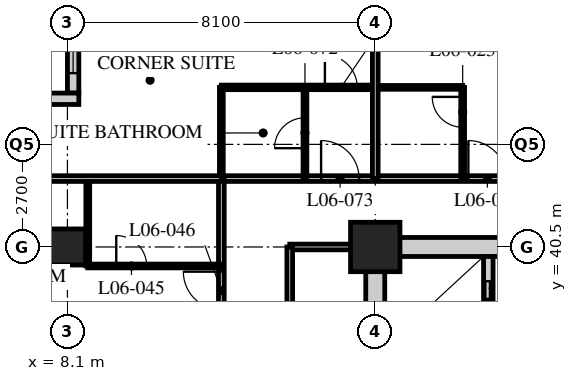
"""IFC4 building model, lengths in metres.
Left out: names, types, materials, properties, quantities, classifications, styles, units other than length and angle.
Written with IfcOpenShell. Run it as: python <this file> out.ifc"""

import sys

from ifc_helpers import new_model, si_unit, direction, frame, frame_2d, origin, origin_2d, place, context, subcontext, project, spatial, rectangle, hollow_rectangle, extrude, element, fill, save


model = new_model("IFC4")
c1 = context("Model", 3, precision=1e-05, world=origin(), true_north=direction((0.0, 1.0)))
c2 = subcontext(c1, "Body", "Model", "MODEL_VIEW")
j1 = project(units=[si_unit("LENGTHUNIT", "METRE"), si_unit("PLANEANGLEUNIT", "RADIAN")], contexts=[c1])
p1 = place(None, origin())
s1 = spatial("IfcSite", under=j1, at=p1, CompositionType="ELEMENT")
p2 = place(p1, origin())
s2 = spatial("IfcBuilding", under=s1, at=p2, CompositionType="ELEMENT")
p3 = place(p2, frame((0.0, 0.0, 33.0)))
s3 = spatial("IfcBuildingStorey", under=s2, at=p3, CompositionType="ELEMENT", Elevation=33.0)
p4 = place(p3, frame((8.1, 40.5, 0.0), z_axis=(0.0, 0.0, 1.0), x_axis=(1.0, 0.0, 0.0)))
e1 = element("IfcColumn", 1, at=p4, inside=s3, PredefinedType="COLUMN", context=c2, shape_type="SweptSolid", body=[
    extrude(hollow_rectangle(XDim=0.95, YDim=0.95, WallThickness=0.095, at=origin_2d()), origin(), (0.0, 0.0, 1.0), 3.4),
])
p5 = place(p3, frame((16.2, 40.5, 0.0), z_axis=(0.0, 0.0, 1.0), x_axis=(1.0, 0.0, 0.0)))
e2 = element("IfcColumn", 2, at=p5, inside=s3, PredefinedType="COLUMN", context=c2, shape_type="SweptSolid", body=[
    extrude(hollow_rectangle(XDim=1.3, YDim=1.3, WallThickness=0.13, at=origin_2d()), origin(), (0.0, 0.0, 1.0), 3.4),
])
p6 = place(p3, frame((8.25, 48.3, 0.0), z_axis=(0.0, 0.0, 1.0), x_axis=(0.0, -1.0, 0.0)))
e3 = element("IfcWall", 3, at=p6, inside=s3, PredefinedType="SOLIDWALL", context=c2, shape_type="SweptSolid", body=[
    extrude(rectangle(XDim=3.75, YDim=0.3, at=frame_2d((1.875, 0.0))), origin(), (0.0, 0.0, 1.0), 3.19),
])
p7 = place(p6, frame((0.225, 0.0, 0.9)))
e4 = element("IfcOpeningElement", 4, at=p7, cuts=e3, PredefinedType="OPENING", context=c2, shape_type="SweptSolid", body=[
    extrude(rectangle(XDim=3.0, YDim=1.5, at=frame_2d((1.5, 0.75))), frame((0.0, 0.16, 0.0), z_axis=(0.0, -1.0, 0.0), x_axis=(1.0, 0.0, 0.0)), (0.0, 0.0, 1.0), 0.32),
])
p8 = place(p3, frame((8.4, 44.4, 0.0), z_axis=(0.0, 0.0, 1.0), x_axis=(-1.0, 0.0, 0.0)))
e5 = element("IfcWall", 5, at=p8, inside=s3, PredefinedType="SOLIDWALL", context=c2, shape_type="SweptSolid", body=[
    extrude(rectangle(XDim=4.35, YDim=0.3, at=frame_2d((2.175, 0.0))), origin(), (0.0, 0.0, 1.0), 3.19),
])
p9 = place(p8, frame((0.825, 0.0, 0.9)))
e6 = element("IfcOpeningElement", 6, at=p9, cuts=e5, PredefinedType="OPENING", context=c2, shape_type="SweptSolid", body=[
    extrude(rectangle(XDim=3.0, YDim=1.5, at=frame_2d((1.5, 0.75))), frame((0.0, 0.16, 0.0), z_axis=(0.0, -1.0, 0.0), x_axis=(1.0, 0.0, 0.0)), (0.0, 0.0, 1.0), 0.32),
])
p10 = place(p3, frame((12.15, 42.3, 0.0), z_axis=(0.0, 0.0, 1.0), x_axis=(1.0, 0.0, 0.0)))
e7 = element("IfcWall", 7, at=p10, inside=s3, PredefinedType="PARTITIONING", context=c2, shape_type="SweptSolid", body=[
    extrude(rectangle(XDim=32.4, YDim=0.15, at=frame_2d((16.2, 0.0))), origin(), (0.0, 0.0, 1.0), 3.19),
])
p11 = place(p10, frame((6.5, 0.0, 0.0)))
e8 = element("IfcOpeningElement", 8, at=p11, cuts=e7, PredefinedType="OPENING", context=c2, shape_type="SweptSolid", body=[
    extrude(rectangle(XDim=1.0, YDim=2.1, at=frame_2d((0.5, 1.05))), frame((0.0, 0.085, 0.0), z_axis=(0.0, -1.0, 0.0), x_axis=(1.0, 0.0, 0.0)), (0.0, 0.0, 1.0), 0.17),
])
p12 = place(p10, frame((8.4, 0.0, 0.0)))
e9 = element("IfcOpeningElement", 9, at=p12, cuts=e7, PredefinedType="OPENING", context=c2, shape_type="SweptSolid", body=[
    extrude(rectangle(XDim=1.0, YDim=2.1, at=frame_2d((0.5, 1.05))), frame((0.0, 0.085, 0.0), z_axis=(0.0, -1.0, 0.0), x_axis=(1.0, 0.0, 0.0)), (0.0, 0.0, 1.0), 0.17),
])
p13 = place(p10, frame((14.6, 0.0, 0.0)))
e10 = element("IfcOpeningElement", 10, at=p13, cuts=e7, PredefinedType="OPENING", context=c2, shape_type="SweptSolid", body=[
    extrude(rectangle(XDim=1.0, YDim=2.1, at=frame_2d((0.5, 1.05))), frame((0.0, 0.085, 0.0), z_axis=(0.0, -1.0, 0.0), x_axis=(1.0, 0.0, 0.0)), (0.0, 0.0, 1.0), 0.17),
])
p14 = place(p10, frame((18.65, 0.0, 0.0)))
e11 = element("IfcOpeningElement", 11, at=p14, cuts=e7, PredefinedType="OPENING", context=c2, shape_type="SweptSolid", body=[
    extrude(rectangle(XDim=1.0, YDim=2.1, at=frame_2d((0.5, 1.05))), frame((0.0, 0.085, 0.0), z_axis=(0.0, -1.0, 0.0), x_axis=(1.0, 0.0, 0.0)), (0.0, 0.0, 1.0), 0.17),
])
p15 = place(p10, frame((23.0, 0.0, 0.0)))
e12 = element("IfcOpeningElement", 12, at=p15, cuts=e7, PredefinedType="OPENING", context=c2, shape_type="SweptSolid", body=[
    extrude(rectangle(XDim=1.0, YDim=2.1, at=frame_2d((0.5, 1.05))), frame((0.0, 0.085, 0.0), z_axis=(0.0, -1.0, 0.0), x_axis=(1.0, 0.0, 0.0)), (0.0, 0.0, 1.0), 0.17),
])
p16 = place(p10, frame((26.75, 0.0, 0.0)))
e13 = element("IfcOpeningElement", 13, at=p16, cuts=e7, PredefinedType="OPENING", context=c2, shape_type="SweptSolid", body=[
    extrude(rectangle(XDim=1.0, YDim=2.1, at=frame_2d((0.5, 1.05))), frame((0.0, 0.085, 0.0), z_axis=(0.0, -1.0, 0.0), x_axis=(1.0, 0.0, 0.0)), (0.0, 0.0, 1.0), 0.17),
])
p17 = place(p10, frame((28.775, 0.0, 0.0)))
e14 = element("IfcOpeningElement", 14, at=p17, cuts=e7, PredefinedType="OPENING", context=c2, shape_type="SweptSolid", body=[
    extrude(rectangle(XDim=1.0, YDim=2.1, at=frame_2d((0.5, 1.05))), frame((0.0, 0.085, 0.0), z_axis=(0.0, -1.0, 0.0), x_axis=(1.0, 0.0, 0.0)), (0.0, 0.0, 1.0), 0.17),
])
p18 = place(p10, frame((2.625, 0.0, 0.0)))
e15 = element("IfcOpeningElement", 15, at=p18, cuts=e7, PredefinedType="OPENING", context=c2, shape_type="SweptSolid", body=[
    extrude(rectangle(XDim=1.0, YDim=2.1, at=frame_2d((0.5, 1.05))), frame((0.0, 0.085, 0.0), z_axis=(0.0, -1.0, 0.0), x_axis=(1.0, 0.0, 0.0)), (0.0, 0.0, 1.0), 0.17),
])
p19 = place(p3, frame((12.15, 16.2, 0.0), z_axis=(0.0, 0.0, 1.0), x_axis=(0.0, 1.0, 0.0)))
e16 = element("IfcWall", 16, at=p19, inside=s3, PredefinedType="PARTITIONING", context=c2, shape_type="SweptSolid", body=[
    extrude(rectangle(XDim=26.1, YDim=0.15, at=frame_2d((13.05, 0.0))), origin(), (0.0, 0.0, 1.0), 3.19),
])
p20 = place(p19, frame((2.75, 0.0, 0.0)))
e17 = element("IfcOpeningElement", 17, at=p20, cuts=e16, PredefinedType="OPENING", context=c2, shape_type="SweptSolid", body=[
    extrude(rectangle(XDim=1.0, YDim=2.1, at=frame_2d((0.5, 1.05))), frame((0.0, 0.085, 0.0), z_axis=(0.0, -1.0, 0.0), x_axis=(1.0, 0.0, 0.0)), (0.0, 0.0, 1.0), 0.17),
])
p21 = place(p19, frame((4.35, 0.0, 0.0)))
e18 = element("IfcOpeningElement", 18, at=p21, cuts=e16, PredefinedType="OPENING", context=c2, shape_type="SweptSolid", body=[
    extrude(rectangle(XDim=1.0, YDim=2.1, at=frame_2d((0.5, 1.05))), frame((0.0, 0.085, 0.0), z_axis=(0.0, -1.0, 0.0), x_axis=(1.0, 0.0, 0.0)), (0.0, 0.0, 1.0), 0.17),
])
p22 = place(p19, frame((10.55, 0.0, 0.0)))
e19 = element("IfcOpeningElement", 19, at=p22, cuts=e16, PredefinedType="OPENING", context=c2, shape_type="SweptSolid", body=[
    extrude(rectangle(XDim=1.0, YDim=2.1, at=frame_2d((0.5, 1.05))), frame((0.0, 0.085, 0.0), z_axis=(0.0, -1.0, 0.0), x_axis=(1.0, 0.0, 0.0)), (0.0, 0.0, 1.0), 0.17),
])
p23 = place(p19, frame((12.45, 0.0, 0.0)))
e20 = element("IfcOpeningElement", 20, at=p23, cuts=e16, PredefinedType="OPENING", context=c2, shape_type="SweptSolid", body=[
    extrude(rectangle(XDim=1.0, YDim=2.1, at=frame_2d((0.5, 1.05))), frame((0.0, 0.085, 0.0), z_axis=(0.0, -1.0, 0.0), x_axis=(1.0, 0.0, 0.0)), (0.0, 0.0, 1.0), 0.17),
])
p24 = place(p19, frame((18.65, 0.0, 0.0)))
e21 = element("IfcOpeningElement", 21, at=p24, cuts=e16, PredefinedType="OPENING", context=c2, shape_type="SweptSolid", body=[
    extrude(rectangle(XDim=1.0, YDim=2.1, at=frame_2d((0.5, 1.05))), frame((0.0, 0.085, 0.0), z_axis=(0.0, -1.0, 0.0), x_axis=(1.0, 0.0, 0.0)), (0.0, 0.0, 1.0), 0.17),
])
p25 = place(p19, frame((22.65, 0.0, 0.0)))
e22 = element("IfcOpeningElement", 22, at=p25, cuts=e16, PredefinedType="OPENING", context=c2, shape_type="SweptSolid", body=[
    extrude(rectangle(XDim=1.0, YDim=2.1, at=frame_2d((0.5, 1.05))), frame((0.0, 0.085, 0.0), z_axis=(0.0, -1.0, 0.0), x_axis=(1.0, 0.0, 0.0)), (0.0, 0.0, 1.0), 0.17),
])
p26 = place(p3, frame((16.0, 40.5, 0.0), z_axis=(0.0, 0.0, 1.0), x_axis=(-1.0, 0.0, 0.0)))
e23 = element("IfcWall", 23, at=p26, inside=s3, PredefinedType="PARTITIONING", context=c2, shape_type="SweptSolid", body=[
    extrude(rectangle(XDim=2.05, YDim=0.15, at=frame_2d((1.025, 0.0))), origin(), (0.0, 0.0, 1.0), 2.578),
])
p27 = place(p3, frame((13.95, 40.5, 0.0), z_axis=(0.0, 0.0, 1.0), x_axis=(0.0, -1.0, 0.0)))
e24 = element("IfcWall", 24, at=p27, inside=s3, PredefinedType="PARTITIONING", context=c2, shape_type="SweptSolid", body=[
    extrude(rectangle(XDim=22.5, YDim=0.15, at=frame_2d((11.25, 0.0))), origin(), (0.0, 0.0, 1.0), 3.19),
])
p28 = place(p27, frame((11.65, 0.0, 0.0)))
e25 = element("IfcOpeningElement", 25, at=p28, cuts=e24, PredefinedType="OPENING", context=c2, shape_type="SweptSolid", body=[
    extrude(rectangle(XDim=1.0, YDim=2.1, at=frame_2d((0.5, 1.05))), frame((0.0, 0.085, 0.0), z_axis=(0.0, -1.0, 0.0), x_axis=(1.0, 0.0, 0.0)), (0.0, 0.0, 1.0), 0.17),
])
p29 = place(p27, frame((3.55, 0.0, 0.0)))
e26 = element("IfcOpeningElement", 26, at=p29, cuts=e24, PredefinedType="OPENING", context=c2, shape_type="SweptSolid", body=[
    extrude(rectangle(XDim=1.0, YDim=2.1, at=frame_2d((0.5, 1.05))), frame((0.0, 0.085, 0.0), z_axis=(0.0, -1.0, 0.0), x_axis=(1.0, 0.0, 0.0)), (0.0, 0.0, 1.0), 0.17),
])
p30 = place(p3, frame((16.2, 44.7, 0.0), z_axis=(0.0, 0.0, 1.0), x_axis=(1.0, 0.0, 0.0)))
e27 = element("IfcWall", 27, at=p30, inside=s3, PredefinedType="PARTITIONING", context=c2, shape_type="SweptSolid", body=[
    extrude(rectangle(XDim=2.3, YDim=0.1, at=frame_2d((1.15, 0.0))), origin(), (0.0, 0.0, 1.0), 3.19),
])
p31 = place(p3, frame((18.5, 42.3, 0.0), z_axis=(0.0, 0.0, 1.0), x_axis=(0.0, 1.0, 0.0)))
e28 = element("IfcWall", 28, at=p31, inside=s3, PredefinedType="PARTITIONING", context=c2, shape_type="SweptSolid", body=[
    extrude(rectangle(XDim=2.4, YDim=0.1, at=frame_2d((1.2, 0.0))), origin(), (0.0, 0.0, 1.0), 3.19),
])
p32 = place(p31, frame((1.35, 0.0, 0.0)))
e29 = element("IfcOpeningElement", 29, at=p32, cuts=e28, PredefinedType="OPENING", context=c2, shape_type="SweptSolid", body=[
    extrude(rectangle(XDim=0.8, YDim=2.1, at=frame_2d((0.4, 1.05))), frame((0.0, 0.06, 0.0), z_axis=(0.0, -1.0, 0.0), x_axis=(1.0, 0.0, 0.0)), (0.0, 0.0, 1.0), 0.12),
])
p33 = place(p3, frame((8.635, 40.0, 0.0), z_axis=(0.0, 0.0, 1.0), x_axis=(0.0, 1.0, 0.0)))
e30 = element("IfcWall", 30, at=p33, inside=s3, PredefinedType="PARTITIONING", context=c2, shape_type="SweptSolid", body=[
    extrude(rectangle(XDim=2.3, YDim=0.1, at=frame_2d((1.15, 0.0))), origin(), (0.0, 0.0, 1.0), 3.19),
])
p34 = place(p3, frame((12.15, 40.0, 0.0), z_axis=(0.0, 0.0, 1.0), x_axis=(-1.0, 0.0, 0.0)))
e31 = element("IfcWall", 31, at=p34, inside=s3, PredefinedType="PARTITIONING", context=c2, shape_type="SweptSolid", body=[
    extrude(rectangle(XDim=3.515, YDim=0.1, at=frame_2d((1.757, 0.0))), origin(), (0.0, 0.0, 1.0), 3.19),
])
p35 = place(p34, frame((1.965, 0.0, 0.0)))
e32 = element("IfcOpeningElement", 32, at=p35, cuts=e31, PredefinedType="OPENING", context=c2, shape_type="SweptSolid", body=[
    extrude(rectangle(XDim=0.8, YDim=2.1, at=frame_2d((0.4, 1.05))), frame((0.0, 0.06, 0.0), z_axis=(0.0, -1.0, 0.0), x_axis=(1.0, 0.0, 0.0)), (0.0, 0.0, 1.0), 0.12),
])
p36 = place(p3, frame((12.15, 44.7, 0.0), z_axis=(0.0, 0.0, 1.0), x_axis=(1.0, 0.0, 0.0)))
e33 = element("IfcWall", 33, at=p36, inside=s3, PredefinedType="PARTITIONING", context=c2, shape_type="SweptSolid", body=[
    extrude(rectangle(XDim=4.05, YDim=0.12, at=frame_2d((2.025, 0.0))), origin(), (0.0, 0.0, 1.0), 3.19),
])
p37 = place(p36, frame((2.725, 0.0, 0.0)))
e34 = element("IfcOpeningElement", 34, at=p37, cuts=e33, PredefinedType="OPENING", context=c2, shape_type="SweptSolid", body=[
    extrude(rectangle(XDim=0.85, YDim=2.1, at=frame_2d((0.425, 1.05))), frame((0.0, 0.07, 0.0), z_axis=(0.0, -1.0, 0.0), x_axis=(1.0, 0.0, 0.0)), (0.0, 0.0, 1.0), 0.14),
])
p38 = place(p3, frame((14.35, 42.3, 0.0), z_axis=(0.0, 0.0, 1.0), x_axis=(0.0, 1.0, 0.0)))
e35 = element("IfcWall", 35, at=p38, inside=s3, PredefinedType="PARTITIONING", context=c2, shape_type="SweptSolid", body=[
    extrude(rectangle(XDim=2.4, YDim=0.1, at=frame_2d((1.2, 0.0))), origin(), (0.0, 0.0, 1.0), 3.19),
])
p39 = place(p38, frame((0.8, 0.0, 0.0)))
e36 = element("IfcOpeningElement", 36, at=p39, cuts=e35, PredefinedType="OPENING", context=c2, shape_type="SweptSolid", body=[
    extrude(rectangle(XDim=0.8, YDim=2.1, at=frame_2d((0.4, 1.05))), frame((0.0, 0.06, 0.0), z_axis=(0.0, -1.0, 0.0), x_axis=(1.0, 0.0, 0.0)), (0.0, 0.0, 1.0), 0.12),
])
p40 = place(p3, frame((12.15, 42.3, 0.0), z_axis=(0.0, 0.0, 1.0), x_axis=(0.0, 1.0, 0.0)))
e37 = element("IfcWall", 37, at=p40, inside=s3, PredefinedType="PARTITIONING", context=c2, shape_type="SweptSolid", body=[
    extrude(rectangle(XDim=2.4, YDim=0.1, at=frame_2d((1.2, 0.0))), origin(), (0.0, 0.0, 1.0), 3.19),
])
p41 = place(p3, frame((4.35, 42.3, 0.0), z_axis=(0.0, 0.0, 1.0), x_axis=(1.0, 0.0, 0.0)))
e38 = element("IfcWall", 38, at=p41, inside=s3, PredefinedType="PARTITIONING", context=c2, shape_type="SweptSolid", body=[
    extrude(rectangle(XDim=7.8, YDim=0.15, at=frame_2d((3.9, 0.0))), origin(), (0.0, 0.0, 1.0), 3.19),
])
p42 = place(p3, frame((16.2, 42.3, 0.0), z_axis=(0.0, 0.0, 1.0), x_axis=(0.0, 1.0, 0.0)))
e39 = element("IfcWall", 39, at=p42, inside=s3, PredefinedType="PARTITIONING", context=c2, shape_type="SweptSolid", body=[
    extrude(rectangle(XDim=6.0, YDim=0.15, at=frame_2d((3.0, 0.0))), origin(), (0.0, 0.0, 1.0), 2.578),
])
p43 = place(p3, frame((15.95, 40.5, 0.0), z_axis=(0.0, 0.0, 1.0), x_axis=(1.0, 0.0, 0.0)))
e40 = element("IfcWall", 40, at=p43, inside=s3, PredefinedType="SOLIDWALL", context=c2, shape_type="SweptSolid", body=[
    extrude(rectangle(XDim=24.8, YDim=0.5, at=frame_2d((12.4, 0.0))), origin(), (0.0, 0.0, 1.0), 2.54),
])
p44 = place(p43, frame((11.5, 0.0, 0.0)))
e41 = element("IfcOpeningElement", 41, at=p44, cuts=e40, PredefinedType="OPENING", context=c2, shape_type="SweptSolid", body=[
    extrude(rectangle(XDim=1.8, YDim=2.4, at=frame_2d((0.9, 1.2))), frame((0.0, 0.26, 0.0), z_axis=(0.0, -1.0, 0.0), x_axis=(1.0, 0.0, 0.0)), (0.0, 0.0, 1.0), 0.52),
])
p45 = place(p3, frame((16.2, 24.55, 0.0), z_axis=(0.0, 0.0, 1.0), x_axis=(0.0, 1.0, 0.0)))
e42 = element("IfcWall", 42, at=p45, inside=s3, PredefinedType="SOLIDWALL", context=c2, shape_type="SweptSolid", body=[
    extrude(rectangle(XDim=15.7, YDim=0.5, at=frame_2d((7.85, 0.0))), origin(), (0.0, 0.0, 1.0), 2.578),
])
p46 = place(p3, frame((19.175, 32.5, 0.0), z_axis=(0.0, 0.0, 1.0), x_axis=(0.0, 1.0, 0.0)))
e43 = element("IfcWall", 43, at=p46, inside=s3, PredefinedType="SOLIDWALL", context=c2, shape_type="SweptSolid", body=[
    extrude(rectangle(XDim=7.75, YDim=0.25, at=frame_2d((3.875, 0.0))), origin(), (0.0, 0.0, 1.0), 3.19),
])
p47 = place(p46, frame((0.8, 0.0, 0.0)))
e44 = element("IfcOpeningElement", 44, at=p47, cuts=e43, PredefinedType="OPENING", context=c2, shape_type="SweptSolid", body=[
    extrude(rectangle(XDim=1.1, YDim=2.4, at=frame_2d((0.55, 1.2))), frame((0.0, 0.135, 0.0), z_axis=(0.0, -1.0, 0.0), x_axis=(1.0, 0.0, 0.0)), (0.0, 0.0, 1.0), 0.27),
])
p48 = place(p46, frame((3.4, 0.0, 0.0)))
e45 = element("IfcOpeningElement", 45, at=p48, cuts=e43, PredefinedType="OPENING", context=c2, shape_type="SweptSolid", body=[
    extrude(rectangle(XDim=1.1, YDim=2.4, at=frame_2d((0.55, 1.2))), frame((0.0, 0.135, 0.0), z_axis=(0.0, -1.0, 0.0), x_axis=(1.0, 0.0, 0.0)), (0.0, 0.0, 1.0), 0.27),
])
p49 = place(p46, frame((6.0, 0.0, 0.0)))
e46 = element("IfcOpeningElement", 46, at=p49, cuts=e43, PredefinedType="OPENING", context=c2, shape_type="SweptSolid", body=[
    extrude(rectangle(XDim=1.1, YDim=2.4, at=frame_2d((0.55, 1.2))), frame((0.0, 0.135, 0.0), z_axis=(0.0, -1.0, 0.0), x_axis=(1.0, 0.0, 0.0)), (0.0, 0.0, 1.0), 0.27),
])
p50 = place(p7, origin())
e47 = element("IfcWindow", 47, at=p50, inside=s3, PartitioningType="SINGLE_PANEL", PredefinedType="WINDOW", context=c2, shape_type="SweptSolid", body=[
    extrude(rectangle(XDim=3.0, YDim=1.5, at=frame_2d((1.5, 0.75))), frame((0.0, 0.03, 0.0), z_axis=(0.0, -1.0, 0.0), x_axis=(1.0, 0.0, 0.0)), (0.0, 0.0, 1.0), 0.06),
])
fill(e4, e47)
p51 = place(p32, origin())
e48 = element("IfcDoor", 48, at=p51, inside=s3, OperationType="SINGLE_SWING_RIGHT", PredefinedType="DOOR", context=c2, shape_type="SweptSolid", body=[
    extrude(rectangle(XDim=0.8, YDim=2.1, at=frame_2d((0.4, 1.05))), frame((0.0, 0.025, 0.0), z_axis=(0.0, -1.0, 0.0), x_axis=(1.0, 0.0, 0.0)), (0.0, 0.0, 1.0), 0.05),
])
fill(e29, e48)
p52 = place(p11, origin())
e49 = element("IfcDoor", 49, at=p52, inside=s3, OperationType="SINGLE_SWING_LEFT", PredefinedType="DOOR", context=c2, shape_type="SweptSolid", body=[
    extrude(rectangle(XDim=1.0, YDim=2.1, at=frame_2d((0.5, 1.05))), frame((0.0, 0.025, 0.0), z_axis=(0.0, -1.0, 0.0), x_axis=(1.0, 0.0, 0.0)), (0.0, 0.0, 1.0), 0.05),
])
fill(e8, e49)
p53 = place(p35, origin())
e50 = element("IfcDoor", 50, at=p53, inside=s3, OperationType="SINGLE_SWING_LEFT", PredefinedType="DOOR", context=c2, shape_type="SweptSolid", body=[
    extrude(rectangle(XDim=0.8, YDim=2.1, at=frame_2d((0.4, 1.05))), frame((0.0, 0.025, 0.0), z_axis=(0.0, -1.0, 0.0), x_axis=(1.0, 0.0, 0.0)), (0.0, 0.0, 1.0), 0.05),
])
fill(e32, e50)
p54 = place(p25, origin())
e51 = element("IfcDoor", 51, at=p54, inside=s3, OperationType="SINGLE_SWING_RIGHT", PredefinedType="DOOR", context=c2, shape_type="SweptSolid", body=[
    extrude(rectangle(XDim=1.0, YDim=2.1, at=frame_2d((0.5, 1.05))), frame((0.0, 0.025, 0.0), z_axis=(0.0, -1.0, 0.0), x_axis=(1.0, 0.0, 0.0)), (0.0, 0.0, 1.0), 0.05),
])
fill(e22, e51)
p55 = place(p39, origin())
e52 = element("IfcDoor", 52, at=p55, inside=s3, OperationType="SINGLE_SWING_LEFT", PredefinedType="DOOR", context=c2, shape_type="SweptSolid", body=[
    extrude(rectangle(XDim=0.8, YDim=2.1, at=frame_2d((0.4, 1.05))), frame((0.0, 0.025, 0.0), z_axis=(0.0, -1.0, 0.0), x_axis=(1.0, 0.0, 0.0)), (0.0, 0.0, 1.0), 0.05),
])
fill(e36, e52)
p56 = place(p18, origin())
e53 = element("IfcDoor", 53, at=p56, inside=s3, OperationType="SINGLE_SWING_LEFT", PredefinedType="DOOR", context=c2, shape_type="SweptSolid", body=[
    extrude(rectangle(XDim=1.0, YDim=2.1, at=frame_2d((0.5, 1.05))), frame((0.0, 0.025, 0.0), z_axis=(0.0, -1.0, 0.0), x_axis=(1.0, 0.0, 0.0)), (0.0, 0.0, 1.0), 0.05),
])
fill(e15, e53)
p57 = place(p37, origin())
e54 = element("IfcDoor", 54, at=p57, inside=s3, OperationType="SINGLE_SWING_LEFT", PredefinedType="DOOR", context=c2, shape_type="SweptSolid", body=[
    extrude(rectangle(XDim=0.85, YDim=2.1, at=frame_2d((0.425, 1.05))), frame((0.0, 0.025, 0.0), z_axis=(0.0, -1.0, 0.0), x_axis=(1.0, 0.0, 0.0)), (0.0, 0.0, 1.0), 0.05),
])
fill(e34, e54)
p58 = place(p49, origin())
e55 = element("IfcDoor", 55, at=p58, inside=s3, OperationType="DOUBLE_DOOR_SLIDING", PredefinedType="DOOR", context=c2, shape_type="SweptSolid", body=[
    extrude(rectangle(XDim=1.1, YDim=2.4, at=frame_2d((0.55, 1.2))), frame((0.0, 0.025, 0.0), z_axis=(0.0, -1.0, 0.0), x_axis=(1.0, 0.0, 0.0)), (0.0, 0.0, 1.0), 0.05),
])
fill(e46, e55)
save(model, sys.argv[1])
